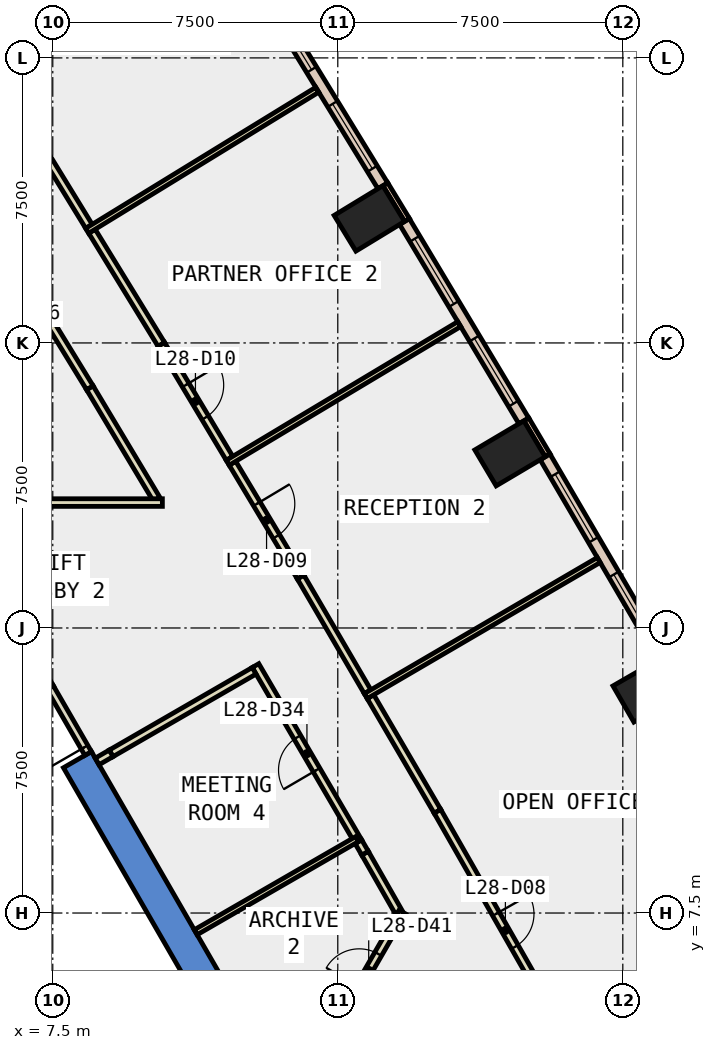
"""IFC4 building model, lengths in metres.
Left out: names, types, materials, properties, quantities, classifications, styles, units other than length and angle.
Written with IfcOpenShell. Run it as: python <this file> out.ifc"""

import sys

from ifc_helpers import new_model, si_unit, direction, frame, frame_2d, origin, origin_2d, place, context, subcontext, project, spatial, polyline, rectangle, outline, extrude, element, fill, save


model = new_model("IFC4")
c1 = context("Model", 3, precision=1e-05, world=origin(), true_north=direction((0.0, 1.0)))
c2 = subcontext(c1, "Body", "Model", "MODEL_VIEW")
j1 = project(units=[si_unit("LENGTHUNIT", "METRE"), si_unit("PLANEANGLEUNIT", "RADIAN")], contexts=[c1])
p1 = place(None, origin())
s1 = spatial("IfcSite", under=j1, at=p1, CompositionType="ELEMENT")
p2 = place(p1, origin())
s2 = spatial("IfcBuilding", under=s1, at=p2, CompositionType="ELEMENT")
p3 = place(p2, frame((0.0, 0.0, 128.6)))
s3 = spatial("IfcBuildingStorey", under=s2, at=p3, CompositionType="ELEMENT", Elevation=128.6)
for number, where, z_axis, x_axis in (
    (1, (23.166, 13.375, -0.4), (0.0, 0.0, 1.0), (-0.5, 0.866, 0.0)),
    (2, (19.532, 19.595, -0.4), (0.0, 0.0, 1.0), (-0.51, 0.86, 0.0)),
    (3, (15.831, 25.776, -0.4), (0.0, 0.0, 1.0), (-0.52, 0.854, 0.0)),
):
    element("IfcColumn", number, at=place(p3, frame(where, z_axis=z_axis, x_axis=x_axis)), inside=s3, PredefinedType="COLUMN", context=c2, shape_type="SweptSolid", body=[
        extrude(rectangle(XDim=1.1, YDim=1.5, at=origin_2d()), origin(), (0.0, 0.0, 1.0), 4.0),
    ])
p4 = place(p3, frame((0.0, 0.0, -0.4)))
e4 = element("IfcWall", 4, at=p4, inside=s3, PredefinedType="SHEAR", context=c2, shape_type="SweptSolid", body=[
    extrude(outline(polyline([(8.517, 11.748), (7.781, 11.323), (12.875, 2.5), (13.856, 2.5), (8.517, 11.748)])), origin(), (0.0, 0.0, 1.0), 4.0),
])
p5 = place(p3, frame((0.0, 0.0, -0.4)))
e5 = element("IfcWall", 5, at=p5, inside=s3, PredefinedType="SHEAR", context=c2, shape_type="SweptSolid", body=[
    extrude(outline(polyline([(6.781, 13.055), (7.517, 13.48), (6.928, 14.5), (6.437, 13.65), (6.781, 13.055)])), origin(), (0.0, 0.0, 1.0), 4.0),
])
p6 = place(p3, frame((20.522, 19.543, 0.0), z_axis=(0.0, 0.0, 1.0), x_axis=(-0.510082245696, 0.860125631885, 0.0)))
e6 = element("IfcWall", 6, at=p6, inside=s3, PredefinedType="STANDARD", context=c2, shape_type="SweptSolid", body=[
    extrude(rectangle(XDim=1.1, YDim=0.15, at=frame_2d((0.55, 0.0))), origin(), (0.0, 0.0, 1.0), 3.6),
])
p7 = place(p3, frame((16.822, 25.735, 0.0), z_axis=(0.0, 0.0, 1.0), x_axis=(-0.519869515594, 0.854245682901, 0.0)))
e7 = element("IfcWall", 7, at=p7, inside=s3, PredefinedType="STANDARD", context=c2, shape_type="SweptSolid", body=[
    extrude(rectangle(XDim=1.1, YDim=0.15, at=frame_2d((0.55, 0.0))), origin(), (0.0, 0.0, 1.0), 3.6),
])
p8 = place(p3, frame((23.538, 14.224, 0.0), z_axis=(0.0, 0.0, 1.0), x_axis=(-0.504441987427, 0.863445586775, 0.0)))
e8 = element("IfcWall", 8, at=p8, inside=s3, PredefinedType="STANDARD", context=c2, shape_type="SweptSolid", body=[
    extrude(rectangle(XDim=6.114, YDim=0.3, at=frame_2d((3.057, 0.0))), origin(), (0.0, 0.0, 1.0), 3.6),
])
p9 = place(p8, frame((0.528, 0.0, 0.9)))
e9 = element("IfcOpeningElement", 9, at=p9, cuts=e8, PredefinedType="OPENING", context=c2, shape_type="SweptSolid", body=[
    extrude(rectangle(XDim=2.0, YDim=2.6, at=frame_2d((1.0, 1.3))), frame((0.0, 0.16, 0.0), z_axis=(0.0, -1.0, 0.0), x_axis=(1.0, 0.0, 0.0)), (0.0, 0.0, 1.0), 0.32),
])
p10 = place(p8, frame((3.585, 0.0, 0.9)))
e10 = element("IfcOpeningElement", 10, at=p10, cuts=e8, PredefinedType="OPENING", context=c2, shape_type="SweptSolid", body=[
    extrude(rectangle(XDim=2.0, YDim=2.6, at=frame_2d((1.0, 1.3))), frame((0.0, 0.16, 0.0), z_axis=(0.0, -1.0, 0.0), x_axis=(1.0, 0.0, 0.0)), (0.0, 0.0, 1.0), 0.32),
])
p11 = place(p3, frame((19.895, 20.449, 0.0), z_axis=(0.0, 0.0, 1.0), x_axis=(-0.513708729904, 0.857964650099, 0.0)))
e11 = element("IfcWall", 11, at=p11, inside=s3, PredefinedType="STANDARD", context=c2, shape_type="SweptSolid", body=[
    extrude(rectangle(XDim=6.115, YDim=0.3, at=frame_2d((3.057, 0.0))), origin(), (0.0, 0.0, 1.0), 3.6),
])
p12 = place(p11, frame((0.529, 0.0, 0.9)))
e12 = element("IfcOpeningElement", 12, at=p12, cuts=e11, PredefinedType="OPENING", context=c2, shape_type="SweptSolid", body=[
    extrude(rectangle(XDim=2.0, YDim=2.6, at=frame_2d((1.0, 1.3))), frame((0.0, 0.16, 0.0), z_axis=(0.0, -1.0, 0.0), x_axis=(1.0, 0.0, 0.0)), (0.0, 0.0, 1.0), 0.32),
])
p13 = place(p11, frame((3.586, 0.0, 0.9)))
e13 = element("IfcOpeningElement", 13, at=p13, cuts=e11, PredefinedType="OPENING", context=c2, shape_type="SweptSolid", body=[
    extrude(rectangle(XDim=2.0, YDim=2.6, at=frame_2d((1.0, 1.3))), frame((0.0, 0.16, 0.0), z_axis=(0.0, -1.0, 0.0), x_axis=(1.0, 0.0, 0.0)), (0.0, 0.0, 1.0), 0.32),
])
p14 = place(p3, frame((16.185, 26.634, 0.0), z_axis=(0.0, 0.0, 1.0), x_axis=(-0.522757750181, 0.8524812811, 0.0)))
e14 = element("IfcWall", 14, at=p14, inside=s3, PredefinedType="STANDARD", context=c2, shape_type="SweptSolid", body=[
    extrude(rectangle(XDim=6.114, YDim=0.3, at=frame_2d((3.057, 0.0))), origin(), (0.0, 0.0, 1.0), 3.6),
])
p15 = place(p14, frame((0.528, 0.0, 0.9)))
e15 = element("IfcOpeningElement", 15, at=p15, cuts=e14, PredefinedType="OPENING", context=c2, shape_type="SweptSolid", body=[
    extrude(rectangle(XDim=2.0, YDim=2.6, at=frame_2d((1.0, 1.3))), frame((0.0, 0.16, 0.0), z_axis=(0.0, -1.0, 0.0), x_axis=(1.0, 0.0, 0.0)), (0.0, 0.0, 1.0), 0.32),
])
p16 = place(p14, frame((3.585, 0.0, 0.9)))
e16 = element("IfcOpeningElement", 16, at=p16, cuts=e14, PredefinedType="OPENING", context=c2, shape_type="SweptSolid", body=[
    extrude(rectangle(XDim=2.0, YDim=2.6, at=frame_2d((1.0, 1.3))), frame((0.0, 0.16, 0.0), z_axis=(0.0, -1.0, 0.0), x_axis=(1.0, 0.0, 0.0)), (0.0, 0.0, 1.0), 0.32),
])
p17 = place(p3, frame((16.601, 7.526, 0.0), z_axis=(0.0, 0.0, 1.0), x_axis=(-0.495652400286, 0.868520983103, 0.0)))
e17 = element("IfcWall", 17, at=p17, inside=s3, PredefinedType="PARTITIONING", context=c2, shape_type="SweptSolid", body=[
    extrude(rectangle(XDim=1.784, YDim=0.2, at=frame_2d((0.892, 0.0))), origin(), (0.0, 0.0, 1.0), 3.6),
])
p18 = place(p3, frame((15.717, 9.075, 0.0), z_axis=(0.0, 0.0, 1.0), x_axis=(-0.50235401398, 0.864662040706, 0.0)))
e18 = element("IfcWall", 18, at=p18, inside=s3, PredefinedType="PARTITIONING", context=c2, shape_type="SweptSolid", body=[
    extrude(rectangle(XDim=0.35, YDim=0.2, at=frame_2d((0.175, 0.0))), origin(), (0.0, 0.0, 1.0), 3.6),
])
p19 = place(p3, frame((15.541, 9.378, 0.0), z_axis=(0.0, 0.0, 1.0), x_axis=(-0.504428354193, 0.863453551435, 0.0)))
e19 = element("IfcWall", 19, at=p19, inside=s3, PredefinedType="PARTITIONING", context=c2, shape_type="SweptSolid", body=[
    extrude(rectangle(XDim=5.365, YDim=0.2, at=frame_2d((2.682, 0.0))), origin(), (0.0, 0.0, 1.0), 3.6),
])
p20 = place(p19, frame((2.182, 0.0, 0.0)))
e20 = element("IfcOpeningElement", 20, at=p20, cuts=e19, PredefinedType="OPENING", context=c2, shape_type="SweptSolid", body=[
    extrude(rectangle(XDim=1.0, YDim=2.1, at=frame_2d((0.5, 1.05))), frame((0.0, 0.11, 0.0), z_axis=(0.0, -1.0, 0.0), x_axis=(1.0, 0.0, 0.0)), (0.0, 0.0, 1.0), 0.22),
])
p21 = place(p3, frame((12.798, 13.873, 0.0), z_axis=(0.0, 0.0, 1.0), x_axis=(-0.866080799279, -0.499904039911, 0.0)))
e21 = element("IfcWall", 21, at=p21, inside=s3, PredefinedType="PARTITIONING", context=c2, shape_type="SweptSolid", body=[
    extrude(rectangle(XDim=4.345, YDim=0.2, at=frame_2d((2.172, 0.0))), origin(), (0.0, 0.0, 1.0), 3.6),
])
p22 = place(p3, frame((10.232, 18.386, 0.0), z_axis=(0.0, 0.0, 1.0), x_axis=(-0.513592824646, 0.858034038062, 0.0)))
e22 = element("IfcWall", 22, at=p22, inside=s3, PredefinedType="PARTITIONING", context=c2, shape_type="SweptSolid", body=[
    extrude(rectangle(XDim=3.421, YDim=0.2, at=frame_2d((1.71, 0.0))), origin(), (0.0, 0.0, 1.0), 3.6),
])
p23 = place(p3, frame((8.475, 21.321, 0.0), z_axis=(0.0, 0.0, 1.0), x_axis=(-0.522743103274, 0.852490262689, 0.0)))
e23 = element("IfcWall", 23, at=p23, inside=s3, PredefinedType="PARTITIONING", context=c2, shape_type="SweptSolid", body=[
    extrude(rectangle(XDim=7.115, YDim=0.2, at=frame_2d((3.557, 0.0))), origin(), (0.0, 0.0, 1.0), 3.6),
])
p24 = place(p23, frame((3.057, 0.0, 0.0)))
e24 = element("IfcOpeningElement", 24, at=p24, cuts=e23, PredefinedType="OPENING", context=c2, shape_type="SweptSolid", body=[
    extrude(rectangle(XDim=1.0, YDim=2.1, at=frame_2d((0.5, 1.05))), frame((0.0, 0.11, 0.0), z_axis=(0.0, -1.0, 0.0), x_axis=(1.0, 0.0, 0.0)), (0.0, 0.0, 1.0), 0.22),
])
p25 = place(p3, frame((15.86, 13.193, 0.0), z_axis=(0.0, 0.0, 1.0), x_axis=(0.504383407959, -0.863479807393, 0.0)))
e25 = element("IfcWall", 25, at=p25, inside=s3, PredefinedType="PARTITIONING", context=c2, shape_type="SweptSolid", body=[
    extrude(rectangle(XDim=3.495, YDim=0.2, at=frame_2d((1.748, 0.0))), origin(), (0.0, 0.0, 1.0), 3.6),
])
p26 = place(p3, frame((17.623, 10.175, 0.0), z_axis=(0.0, 0.0, 1.0), x_axis=(0.4954688358, -0.868625714995, 0.0)))
e26 = element("IfcWall", 26, at=p26, inside=s3, PredefinedType="PARTITIONING", context=c2, shape_type="SweptSolid", body=[
    extrude(rectangle(XDim=7.064, YDim=0.2, at=frame_2d((3.532, 0.0))), origin(), (0.0, 0.0, 1.0), 3.6),
])
p27 = place(p26, frame((3.107, 0.0, 0.0)))
e27 = element("IfcOpeningElement", 27, at=p27, cuts=e26, PredefinedType="OPENING", context=c2, shape_type="SweptSolid", body=[
    extrude(rectangle(XDim=1.0, YDim=2.1, at=frame_2d((0.5, 1.05))), frame((0.0, 0.11, 0.0), z_axis=(0.0, -1.0, 0.0), x_axis=(1.0, 0.0, 0.0)), (0.0, 0.0, 1.0), 0.22),
])
p28 = place(p3, frame((12.228, 19.335, 0.0), z_axis=(0.0, 0.0, 1.0), x_axis=(0.513796731551, -0.857911952736, 0.0)))
e28 = element("IfcWall", 28, at=p28, inside=s3, PredefinedType="PARTITIONING", context=c2, shape_type="SweptSolid", body=[
    extrude(rectangle(XDim=3.493, YDim=0.2, at=frame_2d((1.747, 0.0))), origin(), (0.0, 0.0, 1.0), 3.6),
])
p29 = place(p28, frame((1.247, 0.0, 0.0)))
e29 = element("IfcOpeningElement", 29, at=p29, cuts=e28, PredefinedType="OPENING", context=c2, shape_type="SweptSolid", body=[
    extrude(rectangle(XDim=1.0, YDim=2.1, at=frame_2d((0.5, 1.05))), frame((0.0, 0.11, 0.0), z_axis=(0.0, -1.0, 0.0), x_axis=(1.0, 0.0, 0.0)), (0.0, 0.0, 1.0), 0.22),
])
p30 = place(p3, frame((14.023, 16.338, 0.0), z_axis=(0.0, 0.0, 1.0), x_axis=(0.50424043703, -0.863563304954, 0.0)))
e30 = element("IfcWall", 30, at=p30, inside=s3, PredefinedType="PARTITIONING", context=c2, shape_type="SweptSolid", body=[
    extrude(rectangle(XDim=3.492, YDim=0.2, at=frame_2d((1.746, 0.0))), origin(), (0.0, 0.0, 1.0), 3.6),
])
p31 = place(p3, frame((8.531, 25.439, 0.0), z_axis=(0.0, 0.0, 1.0), x_axis=(0.522704631836, -0.852513852003, 0.0)))
e31 = element("IfcWall", 31, at=p31, inside=s3, PredefinedType="PARTITIONING", context=c2, shape_type="SweptSolid", body=[
    extrude(rectangle(XDim=3.493, YDim=0.2, at=frame_2d((1.747, 0.0))), origin(), (0.0, 0.0, 1.0), 3.6),
])
p32 = place(p3, frame((10.357, 22.461, 0.0), z_axis=(0.0, 0.0, 1.0), x_axis=(0.513467759888, -0.858108885606, 0.0)))
e32 = element("IfcWall", 32, at=p32, inside=s3, PredefinedType="PARTITIONING", context=c2, shape_type="SweptSolid", body=[
    extrude(rectangle(XDim=3.494, YDim=0.2, at=frame_2d((1.747, 0.0))), origin(), (0.0, 0.0, 1.0), 3.6),
])
p33 = place(p32, frame((1.247, 0.0, 0.0)))
e33 = element("IfcOpeningElement", 33, at=p33, cuts=e32, PredefinedType="OPENING", context=c2, shape_type="SweptSolid", body=[
    extrude(rectangle(XDim=1.0, YDim=2.1, at=frame_2d((0.5, 1.05))), frame((0.0, 0.11, 0.0), z_axis=(0.0, -1.0, 0.0), x_axis=(1.0, 0.0, 0.0)), (0.0, 0.0, 1.0), 0.22),
])
p34 = place(p3, frame((6.626, 28.546, 0.0), z_axis=(0.0, 0.0, 1.0), x_axis=(0.522580081027, -0.852590205734, 0.0)))
e34 = element("IfcWall", 34, at=p34, inside=s3, PredefinedType="PARTITIONING", context=c2, shape_type="SweptSolid", body=[
    extrude(rectangle(XDim=3.494, YDim=0.2, at=frame_2d((1.747, 0.0))), origin(), (0.0, 0.0, 1.0), 3.6),
])
p35 = place(p3, frame((11.261, 6.994, 0.0), z_axis=(0.0, 0.0, 1.0), x_axis=(0.866013769041, 0.500020151426, 0.0)))
e35 = element("IfcWall", 35, at=p35, inside=s3, PredefinedType="PARTITIONING", context=c2, shape_type="SweptSolid", body=[
    extrude(rectangle(XDim=4.898, YDim=0.15, at=frame_2d((2.449, 0.0))), origin(), (0.0, 0.0, 1.0), 3.6),
])
p36 = place(p3, frame((13.827, 2.55, 0.0), z_axis=(0.0, 0.0, 1.0), x_axis=(0.500032637853, 0.866006559491, 0.0)))
e36 = element("IfcWall", 36, at=p36, inside=s3, PredefinedType="PARTITIONING", context=c2, shape_type="SweptSolid", body=[
    extrude(rectangle(XDim=5.746, YDim=0.2, at=frame_2d((2.873, 0.0))), origin(), (0.0, 0.0, 1.0), 3.6),
])
p37 = place(p36, frame((2.373, 0.0, 0.0)))
e37 = element("IfcOpeningElement", 37, at=p37, cuts=e36, PredefinedType="OPENING", context=c2, shape_type="SweptSolid", body=[
    extrude(rectangle(XDim=1.0, YDim=2.1, at=frame_2d((0.5, 1.05))), frame((0.0, 0.11, 0.0), z_axis=(0.0, -1.0, 0.0), x_axis=(1.0, 0.0, 0.0)), (0.0, 0.0, 1.0), 0.22),
])
p38 = place(p36, frame((3.473, 0.0, 0.0)))
e38 = element("IfcOpeningElement", 38, at=p38, cuts=e36, PredefinedType="OPENING", context=c2, shape_type="SweptSolid", body=[
    extrude(rectangle(XDim=1.0, YDim=2.1, at=frame_2d((0.5, 1.05))), frame((0.0, 0.11, 0.0), z_axis=(0.0, -1.0, 0.0), x_axis=(1.0, 0.0, 0.0)), (0.0, 0.0, 1.0), 0.22),
])
p39 = place(p3, frame((0.4, 18.3, 0.0), z_axis=(0.0, 0.0, 1.0), x_axis=(1.0, 0.0, 0.0)))
e39 = element("IfcWall", 39, at=p39, inside=s3, PredefinedType="PARTITIONING", context=c2, shape_type="SweptSolid", body=[
    extrude(rectangle(XDim=9.984, YDim=0.2, at=frame_2d((4.992, 0.0))), origin(), (0.0, 0.0, 1.0), 3.6),
])
p40 = place(p3, frame((21.247, 4.024, 0.0), z_axis=(0.0, 0.0, 1.0), x_axis=(0.871261721438, 0.490818716795, 0.0)))
e40 = element("IfcWall", 40, at=p40, inside=s3, PredefinedType="PARTITIONING", context=c2, shape_type="SweptSolid", body=[
    extrude(rectangle(XDim=5.53, YDim=0.15, at=frame_2d((2.765, 0.0))), origin(), (0.0, 0.0, 1.0), 3.6),
])
p41 = place(p3, frame((15.736, 13.207, 0.0), z_axis=(0.0, 0.0, 1.0), x_axis=(0.863454426155, 0.504426856892, 0.0)))
e41 = element("IfcWall", 41, at=p41, inside=s3, PredefinedType="PARTITIONING", context=c2, shape_type="SweptSolid", body=[
    extrude(rectangle(XDim=7.099, YDim=0.15, at=frame_2d((3.55, 0.0))), origin(), (0.0, 0.0, 1.0), 3.6),
])
p42 = place(p3, frame((12.104, 19.348, 0.0), z_axis=(0.0, 0.0, 1.0), x_axis=(0.85799008499, 0.513666247732, 0.0)))
e42 = element("IfcWall", 42, at=p42, inside=s3, PredefinedType="PARTITIONING", context=c2, shape_type="SweptSolid", body=[
    extrude(rectangle(XDim=7.1, YDim=0.15, at=frame_2d((3.55, 0.0))), origin(), (0.0, 0.0, 1.0), 3.6),
])
p43 = place(p3, frame((8.406, 25.451, 0.0), z_axis=(0.0, 0.0, 1.0), x_axis=(0.852520194289, 0.522694287637, 0.0)))
e43 = element("IfcWall", 43, at=p43, inside=s3, PredefinedType="PARTITIONING", context=c2, shape_type="SweptSolid", body=[
    extrude(rectangle(XDim=7.1, YDim=0.15, at=frame_2d((3.55, 0.0))), origin(), (0.0, 0.0, 1.0), 3.6),
])
p44 = place(p3, frame((8.43, 11.698, 0.0), z_axis=(0.0, 0.0, 1.0), x_axis=(-0.50002537861, 0.866010750942, 0.0)))
e44 = element("IfcWall", 44, at=p44, inside=s3, PredefinedType="PARTITIONING", context=c2, shape_type="SweptSolid", body=[
    extrude(rectangle(XDim=2.0, YDim=0.2, at=frame_2d((1.0, 0.0))), origin(), (0.0, 0.0, 1.0), 2.4),
])
p45 = place(p44, frame((0.19, 0.0, 0.0)))
e45 = element("IfcOpeningElement", 45, at=p45, cuts=e44, PredefinedType="OPENING", context=c2, shape_type="SweptSolid", body=[
    extrude(rectangle(XDim=1.8, YDim=2.1, at=frame_2d((0.9, 1.05))), frame((0.0, 0.11, 0.0), z_axis=(0.0, -1.0, 0.0), x_axis=(1.0, 0.0, 0.0)), (0.0, 0.0, 1.0), 0.22),
])
p46 = place(p3, frame((9.035, 11.701, 0.0), z_axis=(0.0, 0.0, 1.0), x_axis=(-0.865544229481, -0.500832493767, 0.0)))
e46 = element("IfcWall", 46, at=p46, inside=s3, PredefinedType="PARTITIONING", context=c2, shape_type="SweptSolid", body=[
    extrude(rectangle(XDim=0.425, YDim=0.2, at=frame_2d((0.212, 0.0))), origin(), (0.0, 0.0, 1.0), 2.4),
])
p47 = place(p3, frame((8.48, 3.412, 0.0), z_axis=(0.0, 0.0, 1.0), x_axis=(-0.499978703459, 0.866037698999, 0.0)))
e47 = element("IfcWall", 47, at=p47, inside=s3, PredefinedType="STANDARD", context=c2, shape_type="SweptSolid", body=[
    extrude(rectangle(XDim=6.9, YDim=0.2, at=frame_2d((3.45, 0.0))), origin(), (0.0, 0.0, 1.0), 3.6),
])
p48 = place(p9, origin())
e48 = element("IfcWindow", 48, at=p48, inside=s3, PartitioningType="SINGLE_PANEL", PredefinedType="WINDOW", context=c2, shape_type="SweptSolid", body=[
    extrude(rectangle(XDim=2.0, YDim=2.6, at=frame_2d((1.0, 1.3))), frame((0.0, 0.03, 0.0), z_axis=(0.0, -1.0, 0.0), x_axis=(1.0, 0.0, 0.0)), (0.0, 0.0, 1.0), 0.06),
])
fill(e9, e48)
p49 = place(p10, origin())
e49 = element("IfcWindow", 49, at=p49, inside=s3, PartitioningType="SINGLE_PANEL", PredefinedType="WINDOW", context=c2, shape_type="SweptSolid", body=[
    extrude(rectangle(XDim=2.0, YDim=2.6, at=frame_2d((1.0, 1.3))), frame((0.0, 0.03, 0.0), z_axis=(0.0, -1.0, 0.0), x_axis=(1.0, 0.0, 0.0)), (0.0, 0.0, 1.0), 0.06),
])
fill(e10, e49)
p50 = place(p12, origin())
e50 = element("IfcWindow", 50, at=p50, inside=s3, PartitioningType="SINGLE_PANEL", PredefinedType="WINDOW", context=c2, shape_type="SweptSolid", body=[
    extrude(rectangle(XDim=2.0, YDim=2.6, at=frame_2d((1.0, 1.3))), frame((0.0, 0.03, 0.0), z_axis=(0.0, -1.0, 0.0), x_axis=(1.0, 0.0, 0.0)), (0.0, 0.0, 1.0), 0.06),
])
fill(e12, e50)
p51 = place(p13, origin())
e51 = element("IfcWindow", 51, at=p51, inside=s3, PartitioningType="SINGLE_PANEL", PredefinedType="WINDOW", context=c2, shape_type="SweptSolid", body=[
    extrude(rectangle(XDim=2.0, YDim=2.6, at=frame_2d((1.0, 1.3))), frame((0.0, 0.03, 0.0), z_axis=(0.0, -1.0, 0.0), x_axis=(1.0, 0.0, 0.0)), (0.0, 0.0, 1.0), 0.06),
])
fill(e13, e51)
p52 = place(p15, origin())
e52 = element("IfcWindow", 52, at=p52, inside=s3, PartitioningType="SINGLE_PANEL", PredefinedType="WINDOW", context=c2, shape_type="SweptSolid", body=[
    extrude(rectangle(XDim=2.0, YDim=2.6, at=frame_2d((1.0, 1.3))), frame((0.0, 0.03, 0.0), z_axis=(0.0, -1.0, 0.0), x_axis=(1.0, 0.0, 0.0)), (0.0, 0.0, 1.0), 0.06),
])
fill(e15, e52)
p53 = place(p16, origin())
e53 = element("IfcWindow", 53, at=p53, inside=s3, PartitioningType="SINGLE_PANEL", PredefinedType="WINDOW", context=c2, shape_type="SweptSolid", body=[
    extrude(rectangle(XDim=2.0, YDim=2.6, at=frame_2d((1.0, 1.3))), frame((0.0, 0.03, 0.0), z_axis=(0.0, -1.0, 0.0), x_axis=(1.0, 0.0, 0.0)), (0.0, 0.0, 1.0), 0.06),
])
fill(e16, e53)
p54 = place(p27, origin())
e54 = element("IfcDoor", 54, at=p54, inside=s3, OperationType="SINGLE_SWING_LEFT", PredefinedType="DOOR", context=c2, shape_type="SweptSolid", body=[
    extrude(rectangle(XDim=1.0, YDim=2.1, at=frame_2d((0.5, 1.05))), frame((0.0, 0.025, 0.0), z_axis=(0.0, -1.0, 0.0), x_axis=(1.0, 0.0, 0.0)), (0.0, 0.0, 1.0), 0.05),
])
fill(e27, e54)
p55 = place(p29, origin())
e55 = element("IfcDoor", 55, at=p55, inside=s3, OperationType="SINGLE_SWING_LEFT", PredefinedType="DOOR", context=c2, shape_type="SweptSolid", body=[
    extrude(rectangle(XDim=1.0, YDim=2.1, at=frame_2d((0.5, 1.05))), frame((0.0, 0.025, 0.0), z_axis=(0.0, -1.0, 0.0), x_axis=(1.0, 0.0, 0.0)), (0.0, 0.0, 1.0), 0.05),
])
fill(e29, e55)
p56 = place(p33, origin())
e56 = element("IfcDoor", 56, at=p56, inside=s3, OperationType="SINGLE_SWING_RIGHT", PredefinedType="DOOR", context=c2, shape_type="SweptSolid", body=[
    extrude(rectangle(XDim=1.0, YDim=2.1, at=frame_2d((0.5, 1.05))), frame((0.0, 0.025, 0.0), z_axis=(0.0, -1.0, 0.0), x_axis=(1.0, 0.0, 0.0)), (0.0, 0.0, 1.0), 0.05),
])
fill(e33, e56)
p57 = place(p20, origin())
e57 = element("IfcDoor", 57, at=p57, inside=s3, OperationType="SINGLE_SWING_LEFT", PredefinedType="DOOR", context=c2, shape_type="SweptSolid", body=[
    extrude(rectangle(XDim=1.0, YDim=2.1, at=frame_2d((0.5, 1.05))), frame((0.0, 0.025, 0.0), z_axis=(0.0, -1.0, 0.0), x_axis=(1.0, 0.0, 0.0)), (0.0, 0.0, 1.0), 0.05),
])
fill(e20, e57)
p58 = place(p38, origin())
e58 = element("IfcDoor", 58, at=p58, inside=s3, OperationType="SINGLE_SWING_RIGHT", PredefinedType="DOOR", context=c2, shape_type="SweptSolid", body=[
    extrude(rectangle(XDim=1.0, YDim=2.1, at=frame_2d((0.5, 1.05))), frame((0.0, 0.025, 0.0), z_axis=(0.0, -1.0, 0.0), x_axis=(1.0, 0.0, 0.0)), (0.0, 0.0, 1.0), 0.05),
])
fill(e38, e58)
p59 = place(p45, origin())
e59 = element("IfcDoor", 59, at=p59, inside=s3, OperationType="DOUBLE_DOOR_SINGLE_SWING", PredefinedType="DOOR", context=c2, shape_type="SweptSolid", body=[
    extrude(rectangle(XDim=1.8, YDim=2.1, at=frame_2d((0.9, 1.05))), frame((0.0, 0.025, 0.0), z_axis=(0.0, -1.0, 0.0), x_axis=(1.0, 0.0, 0.0)), (0.0, 0.0, 1.0), 0.05),
])
fill(e45, e59)
save(model, sys.argv[1])
